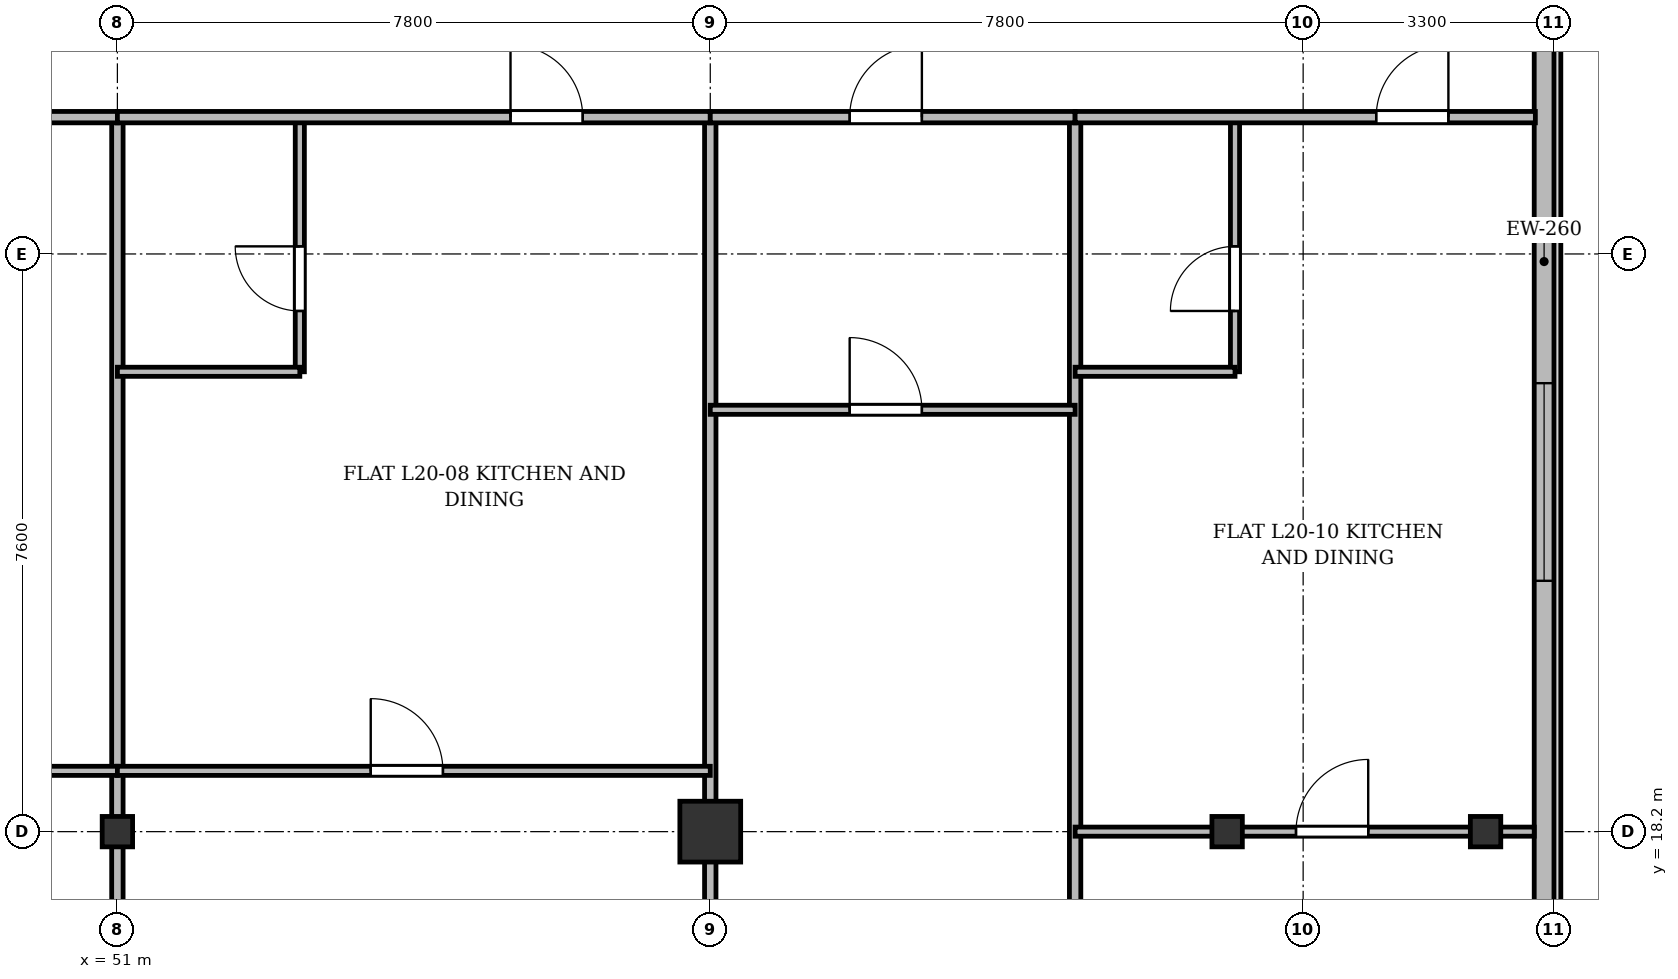
"""IFC4 building model, lengths in metres.
Left out: names, types, materials, properties, quantities, classifications, styles, units other than length and angle.
Written with IfcOpenShell. Run it as: python <this file> out.ifc"""

import sys

from ifc_helpers import new_model, si_unit, direction, frame, frame_2d, origin, origin_2d, place, context, subcontext, project, spatial, rectangle, i_section, extrude, source, transform, mapped, element, fill, save


model = new_model("IFC4")
c1 = context("Model", 3, precision=1e-05, world=origin(), true_north=direction((0.0, 1.0)))
c2 = subcontext(c1, "Body", "Model", "MODEL_VIEW")
j1 = project(units=[si_unit("LENGTHUNIT", "METRE"), si_unit("PLANEANGLEUNIT", "RADIAN")], contexts=[c1])
p1 = place(None, origin())
s1 = spatial("IfcSite", under=j1, at=p1, CompositionType="ELEMENT")
p2 = place(p1, origin())
s2 = spatial("IfcBuilding", under=s1, at=p2, CompositionType="ELEMENT")
p3 = place(p2, frame((0.0, 0.0, 81.7)))
s3 = spatial("IfcBuildingStorey", under=s2, at=p3, CompositionType="ELEMENT", Elevation=81.7)
m1 = source(origin(), c2, "Body", "SweptSolid", [
    extrude(i_section(OverallWidth=0.4, OverallDepth=0.4, WebThickness=0.022, FlangeThickness=0.035, at=origin_2d()), origin(), (0.0, 0.0, 1.0), 3.6),
])
p4 = place(p3, frame((51.0, 18.2, 0.0), z_axis=(0.0, 0.0, 1.0), x_axis=(1.0, 0.0, 0.0)))
e1 = element("IfcColumn", 1, at=p4, inside=s3, PredefinedType="COLUMN", context=c2, shape_type="MappedRepresentation", body=[
    mapped(m1, transform((0.0, 0.0, 0.0), x_axis=(1.0, 0.0, 0.0), y_axis=(0.0, 1.0, 0.0), z_axis=(0.0, 0.0, 1.0), scale=1.0)),
])
m2 = source(origin(), c2, "Body", "SweptSolid", [
    extrude(rectangle(XDim=0.8, YDim=0.8, at=origin_2d()), origin(), (0.0, 0.0, 1.0), 3.6),
])
p5 = place(p3, frame((58.8, 18.2, 0.0), z_axis=(0.0, 0.0, 1.0), x_axis=(1.0, 0.0, 0.0)))
e2 = element("IfcColumn", 2, at=p5, inside=s3, PredefinedType="COLUMN", context=c2, shape_type="MappedRepresentation", body=[
    mapped(m2, transform((0.0, 0.0, 0.0), x_axis=(1.0, 0.0, 0.0), y_axis=(0.0, 1.0, 0.0), z_axis=(0.0, 0.0, 1.0), scale=1.0)),
])
for number, where, z_axis, x_axis in (
    (3, (65.6, 18.2, 0.0), (0.0, 0.0, 1.0), (1.0, 0.0, 0.0)),
    (4, (69.0, 18.2, 0.0), (0.0, 0.0, 1.0), (1.0, 0.0, 0.0)),
):
    element("IfcColumn", number, at=place(p3, frame(where, z_axis=z_axis, x_axis=x_axis)), inside=s3, PredefinedType="COLUMN", context=c2, shape_type="MappedRepresentation", body=[
        mapped(m1, transform((0.0, 0.0, 0.0), x_axis=(1.0, 0.0, 0.0), y_axis=(0.0, 1.0, 0.0), z_axis=(0.0, 0.0, 1.0), scale=1.0)),
    ])
p6 = place(p3, frame((69.77, 45.5, 0.0), z_axis=(0.0, 0.0, 1.0), x_axis=(0.0, -1.0, 0.0)))
e5 = element("IfcWall", 5, at=p6, inside=s3, PredefinedType="SOLIDWALL", context=c2, shape_type="SweptSolid", body=[
    extrude(rectangle(XDim=39.6, YDim=0.26, at=frame_2d((19.8, 0.0))), origin(), (0.0, 0.0, 1.0), 3.34),
])
p7 = place(p6, frame((36.95, 0.0, 0.92)))
e6 = element("IfcOpeningElement", 6, at=p7, cuts=e5, PredefinedType="OPENING", context=c2, shape_type="SweptSolid", body=[
    extrude(rectangle(XDim=1.2, YDim=1.65, at=frame_2d((0.6, 0.825))), frame((0.0, 0.14, 0.0), z_axis=(0.0, -1.0, 0.0), x_axis=(1.0, 0.0, 0.0)), (0.0, 0.0, 1.0), 0.28),
])
p8 = place(p6, frame((32.8, 0.0, 0.92)))
e7 = element("IfcOpeningElement", 7, at=p8, cuts=e5, PredefinedType="OPENING", context=c2, shape_type="SweptSolid", body=[
    extrude(rectangle(XDim=2.6, YDim=1.9, at=frame_2d((1.3, 0.95))), frame((0.0, 0.14, 0.0), z_axis=(0.0, -1.0, 0.0), x_axis=(1.0, 0.0, 0.0)), (0.0, 0.0, 1.0), 0.28),
])
p9 = place(p6, frame((28.6, 0.0, 0.92)))
e8 = element("IfcOpeningElement", 8, at=p9, cuts=e5, PredefinedType="OPENING", context=c2, shape_type="SweptSolid", body=[
    extrude(rectangle(XDim=2.6, YDim=1.9, at=frame_2d((1.3, 0.95))), frame((0.0, 0.14, 0.0), z_axis=(0.0, -1.0, 0.0), x_axis=(1.0, 0.0, 0.0)), (0.0, 0.0, 1.0), 0.28),
])
p10 = place(p6, frame((21.4, 0.0, 0.92)))
e9 = element("IfcOpeningElement", 9, at=p10, cuts=e5, PredefinedType="OPENING", context=c2, shape_type="SweptSolid", body=[
    extrude(rectangle(XDim=2.6, YDim=1.9, at=frame_2d((1.3, 0.95))), frame((0.0, 0.14, 0.0), z_axis=(0.0, -1.0, 0.0), x_axis=(1.0, 0.0, 0.0)), (0.0, 0.0, 1.0), 0.28),
])
p11 = place(p6, frame((7.4, 0.0, 0.92)))
e10 = element("IfcOpeningElement", 10, at=p11, cuts=e5, PredefinedType="OPENING", context=c2, shape_type="SweptSolid", body=[
    extrude(rectangle(XDim=2.6, YDim=1.9, at=frame_2d((1.3, 0.95))), frame((0.0, 0.14, 0.0), z_axis=(0.0, -1.0, 0.0), x_axis=(1.0, 0.0, 0.0)), (0.0, 0.0, 1.0), 0.28),
])
p12 = place(p6, frame((4.5, 0.0, 0.92)))
e11 = element("IfcOpeningElement", 11, at=p12, cuts=e5, PredefinedType="OPENING", context=c2, shape_type="SweptSolid", body=[
    extrude(rectangle(XDim=1.2, YDim=1.65, at=frame_2d((0.6, 0.825))), frame((0.0, 0.14, 0.0), z_axis=(0.0, -1.0, 0.0), x_axis=(1.0, 0.0, 0.0)), (0.0, 0.0, 1.0), 0.28),
])
p13 = place(p6, frame((1.15, 0.0, 0.92)))
e12 = element("IfcOpeningElement", 12, at=p13, cuts=e5, PredefinedType="OPENING", context=c2, shape_type="SweptSolid", body=[
    extrude(rectangle(XDim=1.2, YDim=1.65, at=frame_2d((0.6, 0.825))), frame((0.0, 0.14, 0.0), z_axis=(0.0, -1.0, 0.0), x_axis=(1.0, 0.0, 0.0)), (0.0, 0.0, 1.0), 0.28),
])
for number, where, z_axis, x_axis in (
    (13, (51.0, 3.145, 0.0), (0.0, 0.0, 1.0), (0.0, 1.0, 0.0)),
    (14, (58.8, 3.145, 0.0), (0.0, 0.0, 1.0), (0.0, 1.0, 0.0)),
):
    element("IfcWall", number, at=place(p3, frame(where, z_axis=z_axis, x_axis=x_axis)), inside=s3, PredefinedType="PARTITIONING", context=c2, shape_type="SweptSolid", body=[
        extrude(rectangle(XDim=24.455, YDim=0.15, at=frame_2d((12.228, 0.0))), origin(), (0.0, 0.0, 1.0), 2.84),
    ])
p14 = place(p3, frame((63.6, 3.145, 0.0), z_axis=(0.0, 0.0, 1.0), x_axis=(0.0, 1.0, 0.0)))
e15 = element("IfcWall", 15, at=p14, inside=s3, PredefinedType="PARTITIONING", context=c2, shape_type="SweptSolid", body=[
    extrude(rectangle(XDim=24.455, YDim=0.15, at=frame_2d((12.228, 0.0))), origin(), (0.0, 0.0, 1.0), 2.752),
])
p15 = place(p3, frame((43.8, 19.0, 0.0), z_axis=(0.0, 0.0, 1.0), x_axis=(1.0, 0.0, 0.0)))
e16 = element("IfcWall", 16, at=p15, inside=s3, PredefinedType="PARTITIONING", context=c2, shape_type="SweptSolid", body=[
    extrude(rectangle(XDim=7.2, YDim=0.12, at=frame_2d((3.6, 0.0))), origin(), (0.0, 0.0, 1.0), 2.84),
])
p16 = place(p15, frame((3.125, 0.0, 0.0)))
e17 = element("IfcOpeningElement", 17, at=p16, cuts=e16, PredefinedType="OPENING", context=c2, shape_type="SweptSolid", body=[
    extrude(rectangle(XDim=0.95, YDim=2.15, at=frame_2d((0.475, 1.075))), frame((0.0, 0.07, 0.0), z_axis=(0.0, -1.0, 0.0), x_axis=(1.0, 0.0, 0.0)), (0.0, 0.0, 1.0), 0.14),
])
p17 = place(p3, frame((43.8, 27.6, 0.0), z_axis=(0.0, 0.0, 1.0), x_axis=(1.0, 0.0, 0.0)))
e18 = element("IfcWall", 18, at=p17, inside=s3, PredefinedType="PARTITIONING", context=c2, shape_type="SweptSolid", body=[
    extrude(rectangle(XDim=7.2, YDim=0.15, at=frame_2d((3.6, 0.0))), origin(), (0.0, 0.0, 1.0), 2.84),
])
p18 = place(p17, frame((4.706, 0.0, 0.0)))
e19 = element("IfcOpeningElement", 19, at=p18, cuts=e18, PredefinedType="OPENING", context=c2, shape_type="SweptSolid", body=[
    extrude(rectangle(XDim=0.95, YDim=2.15, at=frame_2d((0.475, 1.075))), frame((0.0, 0.085, 0.0), z_axis=(0.0, -1.0, 0.0), x_axis=(1.0, 0.0, 0.0)), (0.0, 0.0, 1.0), 0.17),
])
p19 = place(p3, frame((51.0, 19.0, 0.0), z_axis=(0.0, 0.0, 1.0), x_axis=(1.0, 0.0, 0.0)))
e20 = element("IfcWall", 20, at=p19, inside=s3, PredefinedType="PARTITIONING", context=c2, shape_type="SweptSolid", body=[
    extrude(rectangle(XDim=7.8, YDim=0.12, at=frame_2d((3.9, 0.0))), origin(), (0.0, 0.0, 1.0), 2.84),
])
p20 = place(p19, frame((3.333, 0.0, 0.0)))
e21 = element("IfcOpeningElement", 21, at=p20, cuts=e20, PredefinedType="OPENING", context=c2, shape_type="SweptSolid", body=[
    extrude(rectangle(XDim=0.95, YDim=2.15, at=frame_2d((0.475, 1.075))), frame((0.0, 0.07, 0.0), z_axis=(0.0, -1.0, 0.0), x_axis=(1.0, 0.0, 0.0)), (0.0, 0.0, 1.0), 0.14),
])
p21 = place(p3, frame((53.4, 24.25, 0.0), z_axis=(0.0, 0.0, 1.0), x_axis=(0.0, 1.0, 0.0)))
e22 = element("IfcWall", 22, at=p21, inside=s3, PredefinedType="PARTITIONING", context=c2, shape_type="SweptSolid", body=[
    extrude(rectangle(XDim=3.35, YDim=0.12, at=frame_2d((1.675, 0.0))), origin(), (0.0, 0.0, 1.0), 2.99),
])
p22 = place(p21, frame((0.8, 0.0, 0.0)))
e23 = element("IfcOpeningElement", 23, at=p22, cuts=e22, PredefinedType="OPENING", context=c2, shape_type="SweptSolid", body=[
    extrude(rectangle(XDim=0.85, YDim=2.1, at=frame_2d((0.425, 1.05))), frame((0.0, 0.07, 0.0), z_axis=(0.0, -1.0, 0.0), x_axis=(1.0, 0.0, 0.0)), (0.0, 0.0, 1.0), 0.14),
])
p23 = place(p3, frame((51.0, 24.25, 0.0), z_axis=(0.0, 0.0, 1.0), x_axis=(1.0, 0.0, 0.0)))
e24 = element("IfcWall", 24, at=p23, inside=s3, PredefinedType="PARTITIONING", context=c2, shape_type="SweptSolid", body=[
    extrude(rectangle(XDim=2.4, YDim=0.12, at=frame_2d((1.2, 0.0))), origin(), (0.0, 0.0, 1.0), 2.84),
])
p24 = place(p3, frame((51.0, 27.6, 0.0), z_axis=(0.0, 0.0, 1.0), x_axis=(1.0, 0.0, 0.0)))
e25 = element("IfcWall", 25, at=p24, inside=s3, PredefinedType="PARTITIONING", context=c2, shape_type="SweptSolid", body=[
    extrude(rectangle(XDim=7.8, YDim=0.15, at=frame_2d((3.9, 0.0))), origin(), (0.0, 0.0, 1.0), 2.84),
])
p25 = place(p24, frame((5.172, 0.0, 0.0)))
e26 = element("IfcOpeningElement", 26, at=p25, cuts=e25, PredefinedType="OPENING", context=c2, shape_type="SweptSolid", body=[
    extrude(rectangle(XDim=0.95, YDim=2.15, at=frame_2d((0.475, 1.075))), frame((0.0, 0.085, 0.0), z_axis=(0.0, -1.0, 0.0), x_axis=(1.0, 0.0, 0.0)), (0.0, 0.0, 1.0), 0.17),
])
p26 = place(p3, frame((58.8, 27.6, 0.0), z_axis=(0.0, 0.0, 1.0), x_axis=(1.0, 0.0, 0.0)))
e27 = element("IfcWall", 27, at=p26, inside=s3, PredefinedType="PARTITIONING", context=c2, shape_type="SweptSolid", body=[
    extrude(rectangle(XDim=4.8, YDim=0.15, at=frame_2d((2.4, 0.0))), origin(), (0.0, 0.0, 1.0), 2.84),
])
p27 = place(p26, frame((1.834, 0.0, 0.0)))
e28 = element("IfcOpeningElement", 28, at=p27, cuts=e27, PredefinedType="OPENING", context=c2, shape_type="SweptSolid", body=[
    extrude(rectangle(XDim=0.95, YDim=2.15, at=frame_2d((0.475, 1.075))), frame((0.0, 0.085, 0.0), z_axis=(0.0, -1.0, 0.0), x_axis=(1.0, 0.0, 0.0)), (0.0, 0.0, 1.0), 0.17),
])
p28 = place(p3, frame((58.8, 23.75, 0.0), z_axis=(0.0, 0.0, 1.0), x_axis=(1.0, 0.0, 0.0)))
e29 = element("IfcWall", 29, at=p28, inside=s3, PredefinedType="PARTITIONING", context=c2, shape_type="SweptSolid", body=[
    extrude(rectangle(XDim=4.8, YDim=0.12, at=frame_2d((2.4, 0.0))), origin(), (0.0, 0.0, 1.0), 2.84),
])
p29 = place(p28, frame((1.834, 0.0, 0.0)))
e30 = element("IfcOpeningElement", 30, at=p29, cuts=e29, PredefinedType="OPENING", context=c2, shape_type="SweptSolid", body=[
    extrude(rectangle(XDim=0.95, YDim=2.15, at=frame_2d((0.475, 1.075))), frame((0.0, 0.07, 0.0), z_axis=(0.0, -1.0, 0.0), x_axis=(1.0, 0.0, 0.0)), (0.0, 0.0, 1.0), 0.14),
])
p30 = place(p3, frame((63.6, 18.2, 0.0), z_axis=(0.0, 0.0, 1.0), x_axis=(1.0, 0.0, 0.0)))
e31 = element("IfcWall", 31, at=p30, inside=s3, PredefinedType="PARTITIONING", context=c2, shape_type="SweptSolid", body=[
    extrude(rectangle(XDim=6.04, YDim=0.12, at=frame_2d((3.02, 0.0))), origin(), (0.0, 0.0, 1.0), 2.752),
])
p31 = place(p30, frame((2.906, 0.0, 0.0)))
e32 = element("IfcOpeningElement", 32, at=p31, cuts=e31, PredefinedType="OPENING", context=c2, shape_type="SweptSolid", body=[
    extrude(rectangle(XDim=0.95, YDim=2.15, at=frame_2d((0.475, 1.075))), frame((0.0, 0.07, 0.0), z_axis=(0.0, -1.0, 0.0), x_axis=(1.0, 0.0, 0.0)), (0.0, 0.0, 1.0), 0.14),
])
p32 = place(p3, frame((65.704, 24.25, 0.0), z_axis=(0.0, 0.0, 1.0), x_axis=(0.0, 1.0, 0.0)))
e33 = element("IfcWall", 33, at=p32, inside=s3, PredefinedType="PARTITIONING", context=c2, shape_type="SweptSolid", body=[
    extrude(rectangle(XDim=3.35, YDim=0.12, at=frame_2d((1.675, 0.0))), origin(), (0.0, 0.0, 1.0), 2.84),
])
p33 = place(p32, frame((0.8, 0.0, 0.0)))
e34 = element("IfcOpeningElement", 34, at=p33, cuts=e33, PredefinedType="OPENING", context=c2, shape_type="SweptSolid", body=[
    extrude(rectangle(XDim=0.85, YDim=2.1, at=frame_2d((0.425, 1.05))), frame((0.0, 0.07, 0.0), z_axis=(0.0, -1.0, 0.0), x_axis=(1.0, 0.0, 0.0)), (0.0, 0.0, 1.0), 0.14),
])
p34 = place(p3, frame((63.6, 24.25, 0.0), z_axis=(0.0, 0.0, 1.0), x_axis=(1.0, 0.0, 0.0)))
e35 = element("IfcWall", 35, at=p34, inside=s3, PredefinedType="PARTITIONING", context=c2, shape_type="SweptSolid", body=[
    extrude(rectangle(XDim=2.104, YDim=0.12, at=frame_2d((1.052, 0.0))), origin(), (0.0, 0.0, 1.0), 2.84),
])
p35 = place(p3, frame((63.6, 27.6, 0.0), z_axis=(0.0, 0.0, 1.0), x_axis=(1.0, 0.0, 0.0)))
e36 = element("IfcWall", 36, at=p35, inside=s3, PredefinedType="PARTITIONING", context=c2, shape_type="SweptSolid", body=[
    extrude(rectangle(XDim=6.055, YDim=0.15, at=frame_2d((3.027, 0.0))), origin(), (0.0, 0.0, 1.0), 2.84),
])
p36 = place(p35, frame((3.961, 0.0, 0.0)))
e37 = element("IfcOpeningElement", 37, at=p36, cuts=e36, PredefinedType="OPENING", context=c2, shape_type="SweptSolid", body=[
    extrude(rectangle(XDim=0.95, YDim=2.15, at=frame_2d((0.475, 1.075))), frame((0.0, 0.085, 0.0), z_axis=(0.0, -1.0, 0.0), x_axis=(1.0, 0.0, 0.0)), (0.0, 0.0, 1.0), 0.17),
])
m3 = source(origin(), c2, "Body", "SweptSolid", [
    extrude(rectangle(XDim=2.6, YDim=1.9, at=frame_2d((1.3, 0.95))), frame((0.0, 0.03, 0.0), z_axis=(0.0, -1.0, 0.0), x_axis=(1.0, 0.0, 0.0)), (0.0, 0.0, 1.0), 0.06),
])
p37 = place(p10, origin())
e38 = element("IfcWindow", 38, at=p37, inside=s3, PartitioningType="SINGLE_PANEL", PredefinedType="WINDOW", context=c2, shape_type="MappedRepresentation", body=[
    mapped(m3, transform((0.0, 0.0, 0.0), x_axis=(1.0, 0.0, 0.0), y_axis=(0.0, 1.0, 0.0), z_axis=(0.0, 0.0, 1.0), scale=1.0)),
])
fill(e9, e38)
m4 = source(origin(), c2, "Body", "SweptSolid", [
    extrude(rectangle(XDim=0.95, YDim=2.15, at=frame_2d((0.475, 1.075))), frame((0.0, 0.025, 0.0), z_axis=(0.0, -1.0, 0.0), x_axis=(1.0, 0.0, 0.0)), (0.0, 0.0, 1.0), 0.05),
])
p38 = place(p20, origin())
e39 = element("IfcDoor", 39, at=p38, inside=s3, OperationType="SINGLE_SWING_LEFT", PredefinedType="DOOR", context=c2, shape_type="MappedRepresentation", body=[
    mapped(m4, transform((0.0, 0.0, 0.0), x_axis=(1.0, 0.0, 0.0), y_axis=(0.0, 1.0, 0.0), z_axis=(0.0, 0.0, 1.0), scale=1.0)),
])
fill(e21, e39)
m5 = source(origin(), c2, "Body", "SweptSolid", [
    extrude(rectangle(XDim=0.85, YDim=2.1, at=frame_2d((0.425, 1.05))), frame((0.0, 0.025, 0.0), z_axis=(0.0, -1.0, 0.0), x_axis=(1.0, 0.0, 0.0)), (0.0, 0.0, 1.0), 0.05),
])
p39 = place(p22, origin())
e40 = element("IfcDoor", 40, at=p39, inside=s3, OperationType="SINGLE_SWING_RIGHT", PredefinedType="DOOR", context=c2, shape_type="MappedRepresentation", body=[
    mapped(m5, transform((0.0, 0.0, 0.0), x_axis=(1.0, 0.0, 0.0), y_axis=(0.0, 1.0, 0.0), z_axis=(0.0, 0.0, 1.0), scale=1.0)),
])
fill(e23, e40)
p40 = place(p25, origin())
e41 = element("IfcDoor", 41, at=p40, inside=s3, OperationType="SINGLE_SWING_LEFT", PredefinedType="DOOR", context=c2, shape_type="MappedRepresentation", body=[
    mapped(m4, transform((0.0, 0.0, 0.0), x_axis=(1.0, 0.0, 0.0), y_axis=(0.0, 1.0, 0.0), z_axis=(0.0, 0.0, 1.0), scale=1.0)),
])
fill(e26, e41)
p41 = place(p27, origin())
e42 = element("IfcDoor", 42, at=p41, inside=s3, OperationType="SINGLE_SWING_RIGHT", PredefinedType="DOOR", context=c2, shape_type="MappedRepresentation", body=[
    mapped(m4, transform((0.0, 0.0, 0.0), x_axis=(1.0, 0.0, 0.0), y_axis=(0.0, 1.0, 0.0), z_axis=(0.0, 0.0, 1.0), scale=1.0)),
])
fill(e28, e42)
p42 = place(p29, origin())
e43 = element("IfcDoor", 43, at=p42, inside=s3, OperationType="SINGLE_SWING_LEFT", PredefinedType="DOOR", context=c2, shape_type="MappedRepresentation", body=[
    mapped(m4, transform((0.0, 0.0, 0.0), x_axis=(1.0, 0.0, 0.0), y_axis=(0.0, 1.0, 0.0), z_axis=(0.0, 0.0, 1.0), scale=1.0)),
])
fill(e30, e43)
p43 = place(p31, origin())
e44 = element("IfcDoor", 44, at=p43, inside=s3, OperationType="SINGLE_SWING_RIGHT", PredefinedType="DOOR", context=c2, shape_type="MappedRepresentation", body=[
    mapped(m4, transform((0.0, 0.0, 0.0), x_axis=(1.0, 0.0, 0.0), y_axis=(0.0, 1.0, 0.0), z_axis=(0.0, 0.0, 1.0), scale=1.0)),
])
fill(e32, e44)
p44 = place(p33, origin())
e45 = element("IfcDoor", 45, at=p44, inside=s3, OperationType="SINGLE_SWING_LEFT", PredefinedType="DOOR", context=c2, shape_type="MappedRepresentation", body=[
    mapped(m5, transform((0.0, 0.0, 0.0), x_axis=(1.0, 0.0, 0.0), y_axis=(0.0, 1.0, 0.0), z_axis=(0.0, 0.0, 1.0), scale=1.0)),
])
fill(e34, e45)
p45 = place(p36, origin())
e46 = element("IfcDoor", 46, at=p45, inside=s3, OperationType="SINGLE_SWING_RIGHT", PredefinedType="DOOR", context=c2, shape_type="MappedRepresentation", body=[
    mapped(m4, transform((0.0, 0.0, 0.0), x_axis=(1.0, 0.0, 0.0), y_axis=(0.0, 1.0, 0.0), z_axis=(0.0, 0.0, 1.0), scale=1.0)),
])
fill(e37, e46)
save(model, sys.argv[1])
